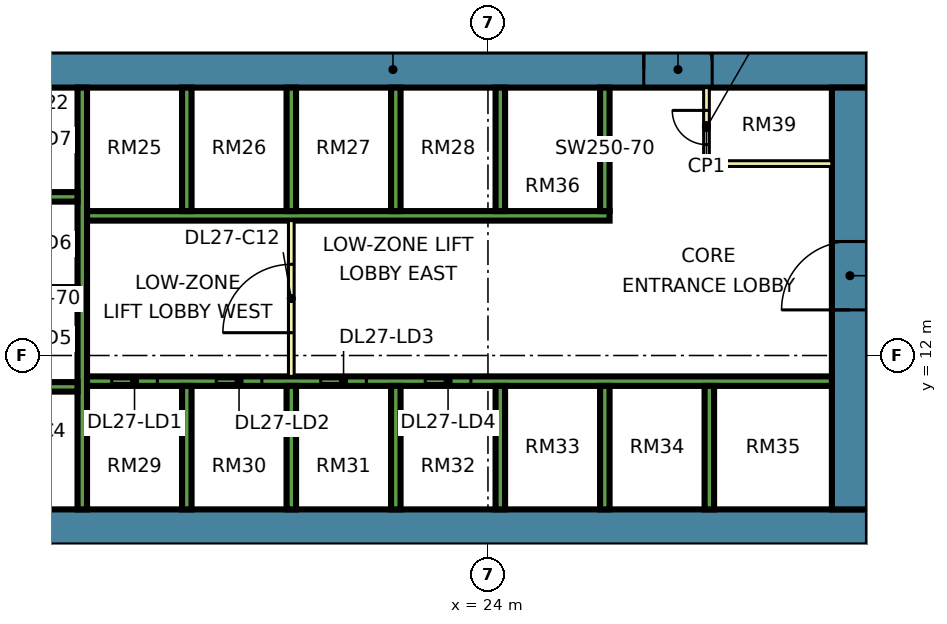
"""IFC4 building model, lengths in metres.
Left out: names, types, materials, properties, quantities, classifications, styles, units other than length and angle.
Written with IfcOpenShell. Run it as: python <this file> out.ifc"""

import sys

from ifc_helpers import new_model, si_unit, direction, frame, frame_2d, origin, place, context, subcontext, project, spatial, rectangle, extrude, element, fill, save


model = new_model("IFC4")
c1 = context("Model", 3, precision=1e-05, world=origin(), true_north=direction((0.0, 1.0)))
c2 = subcontext(c1, "Body", "Model", "MODEL_VIEW")
j1 = project(units=[si_unit("LENGTHUNIT", "METRE"), si_unit("PLANEANGLEUNIT", "RADIAN")], contexts=[c1])
p1 = place(None, origin())
s1 = spatial("IfcSite", under=j1, at=p1, CompositionType="ELEMENT")
p2 = place(p1, origin())
s2 = spatial("IfcBuilding", under=s1, at=p2, CompositionType="ELEMENT")
p3 = place(p2, frame((0.0, 0.0, 118.15)))
s3 = spatial("IfcBuildingStorey", under=s2, at=p3, CompositionType="ELEMENT", Elevation=118.15)
p4 = place(p3, frame((9.0, 7.475, 0.0), z_axis=(0.0, 0.0, 1.0), x_axis=(1.0, 0.0, 0.0)))
e1 = element("IfcWall", 1, at=p4, inside=s3, PredefinedType="SHEAR", context=c2, shape_type="SweptSolid", body=[
    extrude(rectangle(XDim=25.0, YDim=0.95, at=frame_2d((12.5, 0.0))), origin(), (0.0, 0.0, 1.0), 3.75),
])
p5 = place(p3, frame((9.0, 19.525, 0.0), z_axis=(0.0, 0.0, 1.0), x_axis=(1.0, 0.0, 0.0)))
e2 = element("IfcWall", 2, at=p5, inside=s3, PredefinedType="SHEAR", context=c2, shape_type="SweptSolid", body=[
    extrude(rectangle(XDim=25.0, YDim=0.95, at=frame_2d((12.5, 0.0))), origin(), (0.0, 0.0, 1.0), 3.75),
])
p6 = place(p5, frame((19.1, 0.0, 0.0)))
e3 = element("IfcOpeningElement", 3, at=p6, cuts=e2, PredefinedType="OPENING", context=c2, shape_type="SweptSolid", body=[
    extrude(rectangle(XDim=1.8, YDim=2.4, at=frame_2d((0.9, 1.2))), frame((0.0, 0.485, 0.0), z_axis=(0.0, -1.0, 0.0), x_axis=(1.0, 0.0, 0.0)), (0.0, 0.0, 1.0), 0.97),
])
p7 = place(p3, frame((33.525, 7.95, 0.0), z_axis=(0.0, 0.0, 1.0), x_axis=(0.0, 1.0, 0.0)))
e4 = element("IfcWall", 4, at=p7, inside=s3, PredefinedType="SHEAR", context=c2, shape_type="SweptSolid", body=[
    extrude(rectangle(XDim=11.1, YDim=0.95, at=frame_2d((5.55, 0.0))), origin(), (0.0, 0.0, 1.0), 3.75),
])
p8 = place(p7, frame((5.25, 0.0, 0.0)))
e5 = element("IfcOpeningElement", 5, at=p8, cuts=e4, PredefinedType="OPENING", context=c2, shape_type="SweptSolid", body=[
    extrude(rectangle(XDim=1.8, YDim=2.4, at=frame_2d((0.9, 1.2))), frame((0.0, 0.485, 0.0), z_axis=(0.0, -1.0, 0.0), x_axis=(1.0, 0.0, 0.0)), (0.0, 0.0, 1.0), 0.97),
])
p9 = place(p3, frame((13.325, 7.95, 0.0), z_axis=(0.0, 0.0, 1.0), x_axis=(0.0, 1.0, 0.0)))
e6 = element("IfcWall", 6, at=p9, inside=s3, PredefinedType="SHEAR", context=c2, shape_type="SweptSolid", body=[
    extrude(rectangle(XDim=11.1, YDim=0.25, at=frame_2d((5.55, 0.0))), origin(), (0.0, 0.0, 1.0), 3.75),
])
p10 = place(p3, frame((13.45, 11.325, 0.0), z_axis=(0.0, 0.0, 1.0), x_axis=(1.0, 0.0, 0.0)))
e7 = element("IfcWall", 7, at=p10, inside=s3, PredefinedType="SHEAR", context=c2, shape_type="SweptSolid", body=[
    extrude(rectangle(XDim=19.6, YDim=0.25, at=frame_2d((9.8, 0.0))), origin(), (0.0, 0.0, 1.0), 3.75),
])
p11 = place(p10, frame((0.65, 0.0, 0.0)))
e8 = element("IfcOpeningElement", 8, at=p11, cuts=e7, PredefinedType="OPENING", context=c2, shape_type="SweptSolid", body=[
    extrude(rectangle(XDim=1.2, YDim=2.2, at=frame_2d((0.6, 1.1))), frame((0.0, 0.135, 0.0), z_axis=(0.0, -1.0, 0.0), x_axis=(1.0, 0.0, 0.0)), (0.0, 0.0, 1.0), 0.27),
])
p12 = place(p10, frame((3.4, 0.0, 0.0)))
e9 = element("IfcOpeningElement", 9, at=p12, cuts=e7, PredefinedType="OPENING", context=c2, shape_type="SweptSolid", body=[
    extrude(rectangle(XDim=1.2, YDim=2.2, at=frame_2d((0.6, 1.1))), frame((0.0, 0.135, 0.0), z_axis=(0.0, -1.0, 0.0), x_axis=(1.0, 0.0, 0.0)), (0.0, 0.0, 1.0), 0.27),
])
p13 = place(p10, frame((6.15, 0.0, 0.0)))
e10 = element("IfcOpeningElement", 10, at=p13, cuts=e7, PredefinedType="OPENING", context=c2, shape_type="SweptSolid", body=[
    extrude(rectangle(XDim=1.2, YDim=2.2, at=frame_2d((0.6, 1.1))), frame((0.0, 0.135, 0.0), z_axis=(0.0, -1.0, 0.0), x_axis=(1.0, 0.0, 0.0)), (0.0, 0.0, 1.0), 0.27),
])
p14 = place(p10, frame((8.9, 0.0, 0.0)))
e11 = element("IfcOpeningElement", 11, at=p14, cuts=e7, PredefinedType="OPENING", context=c2, shape_type="SweptSolid", body=[
    extrude(rectangle(XDim=1.2, YDim=2.2, at=frame_2d((0.6, 1.1))), frame((0.0, 0.135, 0.0), z_axis=(0.0, -1.0, 0.0), x_axis=(1.0, 0.0, 0.0)), (0.0, 0.0, 1.0), 0.27),
])
p15 = place(p3, frame((13.45, 15.675, 0.0), z_axis=(0.0, 0.0, 1.0), x_axis=(1.0, 0.0, 0.0)))
e12 = element("IfcWall", 12, at=p15, inside=s3, PredefinedType="SHEAR", context=c2, shape_type="SweptSolid", body=[
    extrude(rectangle(XDim=13.75, YDim=0.25, at=frame_2d((6.875, 0.0))), origin(), (0.0, 0.0, 1.0), 3.75),
])
for number, where, z_axis, x_axis in (
    (13, (10.2, 11.175, 0.0), (0.0, 0.0, 1.0), (1.0, 0.0, 0.0)),
    (14, (10.2, 13.675, 0.0), (0.0, 0.0, 1.0), (1.0, 0.0, 0.0)),
    (15, (10.2, 16.175, 0.0), (0.0, 0.0, 1.0), (1.0, 0.0, 0.0)),
):
    element("IfcWall", number, at=place(p3, frame(where, z_axis=z_axis, x_axis=x_axis)), inside=s3, PredefinedType="SHEAR", context=c2, shape_type="SweptSolid", body=[
        extrude(rectangle(XDim=3.0, YDim=0.25, at=frame_2d((1.5, 0.0))), origin(), (0.0, 0.0, 1.0), 3.75),
    ])
for number, where, z_axis, x_axis in (
    (16, (16.075, 7.95, 0.0), (0.0, 0.0, 1.0), (0.0, 1.0, 0.0)),
    (17, (18.825, 7.95, 0.0), (0.0, 0.0, 1.0), (0.0, 1.0, 0.0)),
    (18, (21.575, 7.95, 0.0), (0.0, 0.0, 1.0), (0.0, 1.0, 0.0)),
    (19, (24.325, 7.95, 0.0), (0.0, 0.0, 1.0), (0.0, 1.0, 0.0)),
    (20, (27.075, 7.95, 0.0), (0.0, 0.0, 1.0), (0.0, 1.0, 0.0)),
    (21, (29.825, 7.95, 0.0), (0.0, 0.0, 1.0), (0.0, 1.0, 0.0)),
    (22, (16.075, 15.8, 0.0), (0.0, 0.0, 1.0), (0.0, 1.0, 0.0)),
    (23, (18.825, 15.8, 0.0), (0.0, 0.0, 1.0), (0.0, 1.0, 0.0)),
    (24, (21.575, 15.8, 0.0), (0.0, 0.0, 1.0), (0.0, 1.0, 0.0)),
    (25, (24.325, 15.8, 0.0), (0.0, 0.0, 1.0), (0.0, 1.0, 0.0)),
    (26, (27.075, 15.8, 0.0), (0.0, 0.0, 1.0), (0.0, 1.0, 0.0)),
):
    element("IfcWall", number, at=place(p3, frame(where, z_axis=z_axis, x_axis=x_axis)), inside=s3, PredefinedType="SHEAR", context=c2, shape_type="SweptSolid", body=[
        extrude(rectangle(XDim=3.25, YDim=0.25, at=frame_2d((1.625, 0.0))), origin(), (0.0, 0.0, 1.0), 3.75),
    ])
p16 = place(p3, frame((-1.447, 12.553, 0.0), z_axis=(0.0, 0.0, 1.0), x_axis=(0.707106781187, -0.707106781187, 0.0)))
e27 = element("IfcWall", 27, at=p16, inside=s3, PredefinedType="SOLIDWALL", context=c2, shape_type="SweptSolid", body=[
    extrude(rectangle(XDim=19.799, YDim=0.15, at=frame_2d((9.899, 0.0))), origin(), (0.0, 0.0, 1.0), 3.35),
])
p17 = place(p16, frame((2.212, 0.0, 0.45)))
e28 = element("IfcOpeningElement", 28, at=p17, cuts=e27, PredefinedType="OPENING", context=c2, shape_type="SweptSolid", body=[
    extrude(rectangle(XDim=3.0, YDim=2.4, at=frame_2d((1.5, 1.2))), frame((0.0, 0.085, 0.0), z_axis=(0.0, -1.0, 0.0), x_axis=(1.0, 0.0, 0.0)), (0.0, 0.0, 1.0), 0.17),
])
p18 = place(p16, frame((10.216, 0.0, 0.45)))
e29 = element("IfcOpeningElement", 29, at=p18, cuts=e27, PredefinedType="OPENING", context=c2, shape_type="SweptSolid", body=[
    extrude(rectangle(XDim=3.0, YDim=2.4, at=frame_2d((1.5, 1.2))), frame((0.0, 0.085, 0.0), z_axis=(0.0, -1.0, 0.0), x_axis=(1.0, 0.0, 0.0)), (0.0, 0.0, 1.0), 0.17),
])
p19 = place(p3, frame((18.825, 11.45, 0.0), z_axis=(0.0, 0.0, 1.0), x_axis=(0.0, 1.0, 0.0)))
e30 = element("IfcWall", 30, at=p19, inside=s3, PredefinedType="PARTITIONING", context=c2, shape_type="SweptSolid", body=[
    extrude(rectangle(XDim=4.1, YDim=0.15, at=frame_2d((2.05, 0.0))), origin(), (0.0, 0.0, 1.0), 3.35),
])
p20 = place(p19, frame((1.15, 0.0, 0.0)))
e31 = element("IfcOpeningElement", 31, at=p20, cuts=e30, PredefinedType="OPENING", context=c2, shape_type="SweptSolid", body=[
    extrude(rectangle(XDim=1.8, YDim=2.4, at=frame_2d((0.9, 1.2))), frame((0.0, 0.085, 0.0), z_axis=(0.0, -1.0, 0.0), x_axis=(1.0, 0.0, 0.0)), (0.0, 0.0, 1.0), 0.17),
])
p21 = place(p3, frame((29.75, 17.05, 0.0), z_axis=(0.0, 0.0, 1.0), x_axis=(0.0, 1.0, 0.0)))
e32 = element("IfcWall", 32, at=p21, inside=s3, PredefinedType="PARTITIONING", context=c2, shape_type="SweptSolid", body=[
    extrude(rectangle(XDim=2.0, YDim=0.15, at=frame_2d((1.0, 0.0))), origin(), (0.0, 0.0, 1.0), 3.35),
])
p22 = place(p21, frame((0.5, 0.0, 0.0)))
e33 = element("IfcOpeningElement", 33, at=p22, cuts=e32, PredefinedType="OPENING", context=c2, shape_type="SweptSolid", body=[
    extrude(rectangle(XDim=0.9, YDim=2.1, at=frame_2d((0.45, 1.05))), frame((0.0, 0.085, 0.0), z_axis=(0.0, -1.0, 0.0), x_axis=(1.0, 0.0, 0.0)), (0.0, 0.0, 1.0), 0.17),
])
p23 = place(p3, frame((29.75, 17.05, 0.0), z_axis=(0.0, 0.0, 1.0), x_axis=(1.0, 0.0, 0.0)))
e34 = element("IfcWall", 34, at=p23, inside=s3, PredefinedType="PARTITIONING", context=c2, shape_type="SweptSolid", body=[
    extrude(rectangle(XDim=3.3, YDim=0.15, at=frame_2d((1.65, 0.0))), origin(), (0.0, 0.0, 1.0), 3.35),
])
p24 = place(p11, origin())
e35 = element("IfcDoor", 35, at=p24, inside=s3, OperationType="DOUBLE_DOOR_SLIDING", PredefinedType="DOOR", context=c2, shape_type="SweptSolid", body=[
    extrude(rectangle(XDim=1.2, YDim=2.2, at=frame_2d((0.6, 1.1))), frame((0.0, 0.025, 0.0), z_axis=(0.0, -1.0, 0.0), x_axis=(1.0, 0.0, 0.0)), (0.0, 0.0, 1.0), 0.05),
])
fill(e8, e35)
p25 = place(p12, origin())
e36 = element("IfcDoor", 36, at=p25, inside=s3, OperationType="DOUBLE_DOOR_SLIDING", PredefinedType="DOOR", context=c2, shape_type="SweptSolid", body=[
    extrude(rectangle(XDim=1.2, YDim=2.2, at=frame_2d((0.6, 1.1))), frame((0.0, 0.025, 0.0), z_axis=(0.0, -1.0, 0.0), x_axis=(1.0, 0.0, 0.0)), (0.0, 0.0, 1.0), 0.05),
])
fill(e9, e36)
p26 = place(p13, origin())
e37 = element("IfcDoor", 37, at=p26, inside=s3, OperationType="DOUBLE_DOOR_SLIDING", PredefinedType="DOOR", context=c2, shape_type="SweptSolid", body=[
    extrude(rectangle(XDim=1.2, YDim=2.2, at=frame_2d((0.6, 1.1))), frame((0.0, 0.025, 0.0), z_axis=(0.0, -1.0, 0.0), x_axis=(1.0, 0.0, 0.0)), (0.0, 0.0, 1.0), 0.05),
])
fill(e10, e37)
p27 = place(p14, origin())
e38 = element("IfcDoor", 38, at=p27, inside=s3, OperationType="DOUBLE_DOOR_SLIDING", PredefinedType="DOOR", context=c2, shape_type="SweptSolid", body=[
    extrude(rectangle(XDim=1.2, YDim=2.2, at=frame_2d((0.6, 1.1))), frame((0.0, 0.025, 0.0), z_axis=(0.0, -1.0, 0.0), x_axis=(1.0, 0.0, 0.0)), (0.0, 0.0, 1.0), 0.05),
])
fill(e11, e38)
p28 = place(p8, origin())
e39 = element("IfcDoor", 39, at=p28, inside=s3, OperationType="DOUBLE_DOOR_SINGLE_SWING", PredefinedType="DOOR", context=c2, shape_type="SweptSolid", body=[
    extrude(rectangle(XDim=1.8, YDim=2.4, at=frame_2d((0.9, 1.2))), frame((0.0, 0.025, 0.0), z_axis=(0.0, -1.0, 0.0), x_axis=(1.0, 0.0, 0.0)), (0.0, 0.0, 1.0), 0.05),
])
fill(e5, e39)
p29 = place(p6, origin())
e40 = element("IfcDoor", 40, at=p29, inside=s3, OperationType="DOUBLE_DOOR_SINGLE_SWING", PredefinedType="DOOR", context=c2, shape_type="SweptSolid", body=[
    extrude(rectangle(XDim=1.8, YDim=2.4, at=frame_2d((0.9, 1.2))), frame((0.0, 0.025, 0.0), z_axis=(0.0, -1.0, 0.0), x_axis=(1.0, 0.0, 0.0)), (0.0, 0.0, 1.0), 0.05),
])
fill(e3, e40)
p30 = place(p20, origin())
e41 = element("IfcDoor", 41, at=p30, inside=s3, OperationType="DOUBLE_DOOR_SINGLE_SWING", PredefinedType="DOOR", context=c2, shape_type="SweptSolid", body=[
    extrude(rectangle(XDim=1.8, YDim=2.4, at=frame_2d((0.9, 1.2))), frame((0.0, 0.025, 0.0), z_axis=(0.0, -1.0, 0.0), x_axis=(1.0, 0.0, 0.0)), (0.0, 0.0, 1.0), 0.05),
])
fill(e31, e41)
p31 = place(p22, frame((0.9, 0.0, 0.0), z_axis=(0.0, 0.0, 1.0), x_axis=(-1.0, 0.0, 0.0)))
e42 = element("IfcDoor", 42, at=p31, inside=s3, OperationType="SINGLE_SWING_RIGHT", PredefinedType="DOOR", context=c2, shape_type="SweptSolid", body=[
    extrude(rectangle(XDim=0.9, YDim=2.1, at=frame_2d((0.45, 1.05))), frame((0.0, 0.025, 0.0), z_axis=(0.0, -1.0, 0.0), x_axis=(1.0, 0.0, 0.0)), (0.0, 0.0, 1.0), 0.05),
])
fill(e33, e42)
save(model, sys.argv[1])
